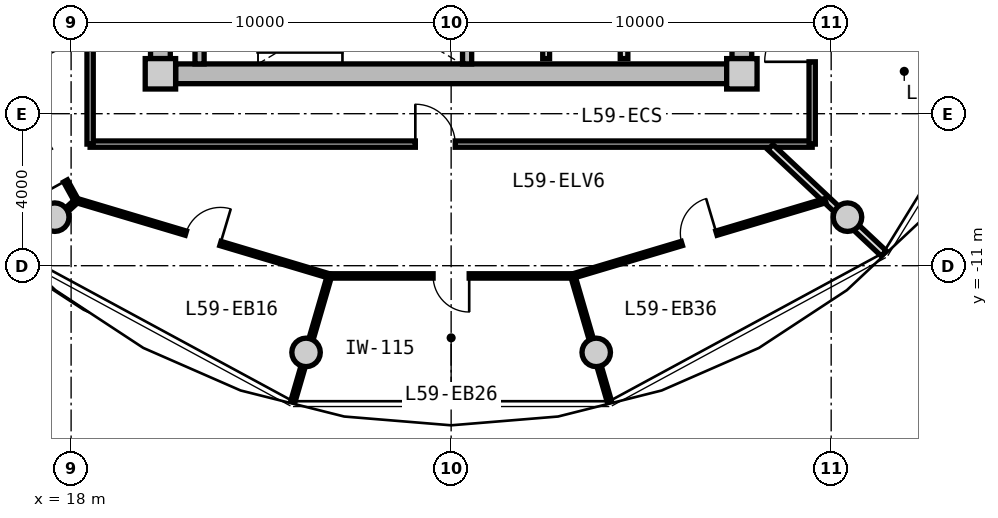
"""IFC4 building model, lengths in metres.
Left out: names, types, materials, properties, quantities, classifications, styles, units other than length and angle.
Written with IfcOpenShell. Run it as: python <this file> out.ifc"""

import sys

from ifc_helpers import new_model, si_unit, direction, frame, frame_2d, origin, origin_2d, place, context, subcontext, project, spatial, rectangle, circle, extrude, source, transform, mapped, element, fill, save


model = new_model("IFC4")
c1 = context("Model", 3, precision=1e-05, world=origin(), true_north=direction((0.0, 1.0)))
c2 = subcontext(c1, "Body", "Model", "MODEL_VIEW")
j1 = project(units=[si_unit("LENGTHUNIT", "METRE"), si_unit("PLANEANGLEUNIT", "RADIAN")], contexts=[c1])
p1 = place(None, origin())
s1 = spatial("IfcSite", under=j1, at=p1, CompositionType="ELEMENT")
p2 = place(p1, origin())
s2 = spatial("IfcBuilding", under=s1, at=p2, CompositionType="ELEMENT")
p3 = place(p2, frame((0.0, 0.0, 190.65)))
s3 = spatial("IfcBuildingStorey", under=s2, at=p3, CompositionType="ELEMENT", Elevation=190.65)
m1 = source(origin(), c2, "Body", "SweptSolid", [
    extrude(rectangle(XDim=0.8, YDim=0.8, at=origin_2d()), origin(), (0.0, 0.0, 1.0), 3.05),
])
for number, where, z_axis, x_axis in (
    (1, (20.35, -5.95, 0.0), (0.0, 0.0, 1.0), (1.0, 0.0, 0.0)),
    (2, (35.65, -5.95, 0.0), (0.0, 0.0, 1.0), (1.0, 0.0, 0.0)),
):
    element("IfcColumn", number, at=place(p3, frame(where, z_axis=z_axis, x_axis=x_axis)), inside=s3, PredefinedType="COLUMN", context=c2, shape_type="MappedRepresentation", body=[
        mapped(m1, transform((0.0, 0.0, 0.0), x_axis=(1.0, 0.0, 0.0), y_axis=(0.0, 1.0, 0.0), z_axis=(0.0, 0.0, 1.0), scale=1.0)),
    ])
m2 = source(origin(), c2, "Body", "SweptSolid", [
    extrude(rectangle(XDim=14.5, YDim=0.52, at=frame_2d((7.25, 0.0))), origin(), (0.0, 0.0, 1.0), 2.81),
])
p4 = place(p3, frame((35.25, -5.95, 0.0), z_axis=(0.0, 0.0, 1.0), x_axis=(-1.0, 0.0, 0.0)))
e3 = element("IfcWall", 3, at=p4, inside=s3, PredefinedType="SHEAR", context=c2, shape_type="MappedRepresentation", body=[
    mapped(m2, transform((0.0, 0.0, 0.0), x_axis=(1.0, 0.0, 0.0), y_axis=(0.0, 1.0, 0.0), z_axis=(0.0, 0.0, 1.0), scale=1.0)),
])
m3 = source(origin(), c2, "Body", "SweptSolid", [
    extrude(rectangle(XDim=11.1, YDim=0.52, at=frame_2d((5.55, 0.0))), origin(), (0.0, 0.0, 1.0), 2.81),
])
p5 = place(p3, frame((20.35, -5.55, 0.0), z_axis=(0.0, 0.0, 1.0), x_axis=(0.0, 1.0, 0.0)))
e4 = element("IfcWall", 4, at=p5, inside=s3, PredefinedType="SHEAR", context=c2, shape_type="MappedRepresentation", body=[
    mapped(m3, transform((0.0, 0.0, 0.0), x_axis=(1.0, 0.0, 0.0), y_axis=(0.0, 1.0, 0.0), z_axis=(0.0, 0.0, 1.0), scale=1.0)),
])
p6 = place(p5, frame((3.8, 0.0, 0.0)))
e5 = element("IfcOpeningElement", 5, at=p6, cuts=e4, PredefinedType="OPENING", context=c2, shape_type="SweptSolid", body=[
    extrude(rectangle(XDim=1.2, YDim=2.15, at=frame_2d((0.6, 1.075))), frame((0.0, 0.27, 0.0), z_axis=(0.0, -1.0, 0.0), x_axis=(1.0, 0.0, 0.0)), (0.0, 0.0, 1.0), 0.54),
])
p7 = place(p3, frame((35.65, 5.55, 0.0), z_axis=(0.0, 0.0, 1.0), x_axis=(0.0, -1.0, 0.0)))
e6 = element("IfcWall", 6, at=p7, inside=s3, PredefinedType="SHEAR", context=c2, shape_type="MappedRepresentation", body=[
    mapped(m3, transform((0.0, 0.0, 0.0), x_axis=(1.0, 0.0, 0.0), y_axis=(0.0, 1.0, 0.0), z_axis=(0.0, 0.0, 1.0), scale=1.0)),
])
p8 = place(p7, frame((5.65, 0.0, 0.0)))
e7 = element("IfcOpeningElement", 7, at=p8, cuts=e6, PredefinedType="OPENING", context=c2, shape_type="SweptSolid", body=[
    extrude(rectangle(XDim=1.2, YDim=2.15, at=frame_2d((0.6, 1.075))), frame((0.0, 0.27, 0.0), z_axis=(0.0, -1.0, 0.0), x_axis=(1.0, 0.0, 0.0)), (0.0, 0.0, 1.0), 0.54),
])
p9 = place(p7, frame((9.3, 0.0, 0.0)))
e8 = element("IfcOpeningElement", 8, at=p9, cuts=e6, PredefinedType="OPENING", context=c2, shape_type="SweptSolid", body=[
    extrude(rectangle(XDim=1.0, YDim=2.1, at=frame_2d((0.5, 1.05))), frame((0.0, 0.27, 0.0), z_axis=(0.0, -1.0, 0.0), x_axis=(1.0, 0.0, 0.0)), (0.0, 0.0, 1.0), 0.54),
])
m4 = source(origin(), c2, "Body", "SweptSolid", [
    extrude(circle(Radius=0.375, at=origin_2d()), origin(), (0.0, 0.0, 1.0), 3.47),
])
for number, where, z_axis, x_axis in (
    (9, (17.57, -9.723, -0.42), (0.0, 0.0, 1.0), (1.0, 0.0, 0.0)),
    (10, (24.182, -13.281, -0.42), (0.0, 0.0, 1.0), (1.0, 0.0, 0.0)),
    (11, (31.818, -13.281, -0.42), (0.0, 0.0, 1.0), (1.0, 0.0, 0.0)),
    (12, (38.43, -9.723, -0.42), (0.0, 0.0, 1.0), (1.0, 0.0, 0.0)),
):
    element("IfcColumn", number, at=place(p3, frame(where, z_axis=z_axis, x_axis=x_axis)), inside=s3, PredefinedType="COLUMN", context=c2, shape_type="MappedRepresentation", body=[
        mapped(m4, transform((0.0, 0.0, 0.0), x_axis=(1.0, 0.0, 0.0), y_axis=(0.0, 1.0, 0.0), z_axis=(0.0, 0.0, 1.0), scale=1.0)),
    ])
m5 = source(origin(), c2, "Body", "SweptSolid", [
    extrude(rectangle(XDim=3.24, YDim=0.24, at=frame_2d((1.62, 0.0))), origin(), (0.0, 0.0, 1.0), 2.81),
])
for number, where, z_axis, x_axis in (
    (13, (21.38, -5.69, 0.0), (0.0, 0.0, 1.0), (0.0, 1.0, 0.0)),
    (14, (28.42, -5.69, 0.0), (0.0, 0.0, 1.0), (0.0, 1.0, 0.0)),
):
    element("IfcWall", number, at=place(p3, frame(where, z_axis=z_axis, x_axis=x_axis)), inside=s3, PredefinedType="PARTITIONING", context=c2, shape_type="MappedRepresentation", body=[
        mapped(m5, transform((0.0, 0.0, 0.0), x_axis=(1.0, 0.0, 0.0), y_axis=(0.0, 1.0, 0.0), z_axis=(0.0, 0.0, 1.0), scale=1.0)),
    ])
m6 = source(origin(), c2, "Body", "SweptSolid", [
    extrude(rectangle(XDim=3.8, YDim=0.2, at=frame_2d((1.9, 0.0))), origin(), (0.0, 0.0, 1.0), 2.795),
])
p10 = place(p3, frame((32.55, -5.55, 0.0), z_axis=(0.0, 0.0, 1.0), x_axis=(0.0, 1.0, 0.0)))
e15 = element("IfcWall", 15, at=p10, inside=s3, PredefinedType="PARTITIONING", context=c2, shape_type="MappedRepresentation", body=[
    mapped(m6, transform((0.0, 0.0, 0.0), x_axis=(1.0, 0.0, 0.0), y_axis=(0.0, 1.0, 0.0), z_axis=(0.0, 0.0, 1.0), scale=1.0)),
])
m7 = source(origin(), c2, "Body", "SweptSolid", [
    extrude(rectangle(XDim=4.2, YDim=0.18, at=frame_2d((2.1, 0.0))), origin(), (0.0, 0.0, 1.0), 2.795),
])
p11 = place(p3, frame((30.5, -5.55, 0.0), z_axis=(0.0, 0.0, 1.0), x_axis=(0.0, 1.0, 0.0)))
e16 = element("IfcWall", 16, at=p11, inside=s3, PredefinedType="PARTITIONING", context=c2, shape_type="MappedRepresentation", body=[
    mapped(m7, transform((0.0, 0.0, 0.0), x_axis=(1.0, 0.0, 0.0), y_axis=(0.0, 1.0, 0.0), z_axis=(0.0, 0.0, 1.0), scale=1.0)),
])
m8 = source(origin(), c2, "Body", "SweptSolid", [
    extrude(rectangle(XDim=19.0, YDim=0.165, at=frame_2d((9.5, 0.0))), origin(), (0.0, 0.0, 1.0), 2.795),
])
p12 = place(p3, frame((37.5, -7.8, 0.0), z_axis=(0.0, 0.0, 1.0), x_axis=(-1.0, 0.0, 0.0)))
e17 = element("IfcWall", 17, at=p12, inside=s3, PredefinedType="PARTITIONING", context=c2, shape_type="MappedRepresentation", body=[
    mapped(m8, transform((0.0, 0.0, 0.0), x_axis=(1.0, 0.0, 0.0), y_axis=(0.0, 1.0, 0.0), z_axis=(0.0, 0.0, 1.0), scale=1.0)),
])
p13 = place(p12, frame((9.392, 0.0, 0.0)))
e18 = element("IfcOpeningElement", 18, at=p13, cuts=e17, PredefinedType="OPENING", context=c2, shape_type="SweptSolid", body=[
    extrude(rectangle(XDim=1.05, YDim=2.15, at=frame_2d((0.525, 1.075))), frame((0.0, 0.093, 0.0), z_axis=(0.0, -1.0, 0.0), x_axis=(1.0, 0.0, 0.0)), (0.0, 0.0, 1.0), 0.185),
])
m9 = source(origin(), c2, "Body", "SweptSolid", [
    extrude(rectangle(XDim=6.88, YDim=0.165, at=frame_2d((3.44, 0.0))), origin(), (0.0, 0.0, 1.0), 2.795),
])
p14 = place(p3, frame((18.5, -7.8, 0.0), z_axis=(0.0, 0.0, 1.0), x_axis=(0.0, 1.0, 0.0)))
e19 = element("IfcWall", 19, at=p14, inside=s3, PredefinedType="PARTITIONING", context=c2, shape_type="MappedRepresentation", body=[
    mapped(m9, transform((0.0, 0.0, 0.0), x_axis=(1.0, 0.0, 0.0), y_axis=(0.0, 1.0, 0.0), z_axis=(0.0, 0.0, 1.0), scale=1.0)),
])
p15 = place(p3, frame((37.5, -0.92, 0.0), z_axis=(0.0, 0.0, 1.0), x_axis=(0.0, -1.0, 0.0)))
e20 = element("IfcWall", 20, at=p15, inside=s3, PredefinedType="PARTITIONING", context=c2, shape_type="MappedRepresentation", body=[
    mapped(m9, transform((0.0, 0.0, 0.0), x_axis=(1.0, 0.0, 0.0), y_axis=(0.0, 1.0, 0.0), z_axis=(0.0, 0.0, 1.0), scale=1.0)),
])
p16 = place(p15, frame((3.464, 0.0, 0.0)))
e21 = element("IfcOpeningElement", 21, at=p16, cuts=e20, PredefinedType="OPENING", context=c2, shape_type="SweptSolid", body=[
    extrude(rectangle(XDim=1.25, YDim=2.2, at=frame_2d((0.625, 1.1))), frame((0.0, 0.093, 0.0), z_axis=(0.0, -1.0, 0.0), x_axis=(1.0, 0.0, 0.0)), (0.0, 0.0, 1.0), 0.185),
])
m10 = source(origin(), c2, "Body", "SweptSolid", [
    extrude(rectangle(XDim=4.089, YDim=0.19, at=frame_2d((2.044, 0.0))), origin(), (0.0, 0.0, 1.0), 2.395),
])
p17 = place(p3, frame((36.402, -7.88, 0.0), z_axis=(0.0, 0.0, 1.0), x_axis=(0.729401273609, -0.684086092577, 0.0)))
e22 = element("IfcWall", 22, at=p17, inside=s3, PredefinedType="PARTITIONING", context=c2, shape_type="MappedRepresentation", body=[
    mapped(m10, transform((0.0, 0.0, 0.0), x_axis=(1.0, 0.0, 0.0), y_axis=(0.0, 1.0, 0.0), z_axis=(0.0, 0.0, 1.0), scale=1.0)),
])
m11 = source(origin(), c2, "Body", "SweptSolid", [
    extrude(rectangle(XDim=6.936, YDim=0.115, at=frame_2d((3.468, 0.0))), origin(), (0.0, 0.0, 1.0), 2.795),
])
p18 = place(p3, frame((18.151, -9.287, 0.0), z_axis=(0.0, 0.0, 1.0), x_axis=(0.958186895835, -0.286143098205, 0.0)))
e23 = element("IfcWall", 23, at=p18, inside=s3, PredefinedType="PARTITIONING", context=c2, shape_type="MappedRepresentation", body=[
    mapped(m11, transform((0.0, 0.0, 0.0), x_axis=(1.0, 0.0, 0.0), y_axis=(0.0, 1.0, 0.0), z_axis=(0.0, 0.0, 1.0), scale=1.0)),
])
p19 = place(p18, frame((2.993, 0.0, 0.0)))
e24 = element("IfcOpeningElement", 24, at=p19, cuts=e23, PredefinedType="OPENING", context=c2, shape_type="SweptSolid", body=[
    extrude(rectangle(XDim=0.95, YDim=2.1, at=frame_2d((0.475, 1.05))), frame((0.0, 0.067, 0.0), z_axis=(0.0, -1.0, 0.0), x_axis=(1.0, 0.0, 0.0)), (0.0, 0.0, 1.0), 0.135),
])
m12 = source(origin(), c2, "Body", "SweptSolid", [
    extrude(rectangle(XDim=2.072, YDim=0.115, at=frame_2d((1.036, 0.0))), origin(), (0.0, 0.0, 1.0), 2.395),
])
p20 = place(p3, frame((18.151, -9.287, 0.0), z_axis=(0.0, 0.0, 1.0), x_axis=(-0.741410125356, -0.671052178314, 0.0)))
e25 = element("IfcWall", 25, at=p20, inside=s3, PredefinedType="PARTITIONING", context=c2, shape_type="MappedRepresentation", body=[
    mapped(m12, transform((0.0, 0.0, 0.0), x_axis=(1.0, 0.0, 0.0), y_axis=(0.0, 1.0, 0.0), z_axis=(0.0, 0.0, 1.0), scale=1.0)),
])
m13 = source(origin(), c2, "Body", "SweptSolid", [
    extrude(rectangle(XDim=6.404, YDim=0.115, at=frame_2d((3.202, 0.0))), origin(), (0.0, 0.0, 1.0), 2.795),
])
p21 = place(p3, frame((24.798, -11.269, 0.0), z_axis=(0.0, 0.0, 1.0), x_axis=(1.0, 0.0, 0.0)))
e26 = element("IfcWall", 26, at=p21, inside=s3, PredefinedType="PARTITIONING", context=c2, shape_type="MappedRepresentation", body=[
    mapped(m13, transform((0.0, 0.0, 0.0), x_axis=(1.0, 0.0, 0.0), y_axis=(0.0, 1.0, 0.0), z_axis=(0.0, 0.0, 1.0), scale=1.0)),
])
p22 = place(p21, frame((2.727, 0.0, 0.0)))
e27 = element("IfcOpeningElement", 27, at=p22, cuts=e26, PredefinedType="OPENING", context=c2, shape_type="SweptSolid", body=[
    extrude(rectangle(XDim=0.95, YDim=2.1, at=frame_2d((0.475, 1.05))), frame((0.0, 0.067, 0.0), z_axis=(0.0, -1.0, 0.0), x_axis=(1.0, 0.0, 0.0)), (0.0, 0.0, 1.0), 0.135),
])
m14 = source(origin(), c2, "Body", "SweptSolid", [
    extrude(rectangle(XDim=3.454, YDim=0.115, at=frame_2d((1.727, 0.0))), origin(), (0.0, 0.0, 1.0), 2.395),
])
p23 = place(p3, frame((24.798, -11.269, 0.0), z_axis=(0.0, 0.0, 1.0), x_axis=(-0.279348499358, -0.960189781193, 0.0)))
e28 = element("IfcWall", 28, at=p23, inside=s3, PredefinedType="PARTITIONING", context=c2, shape_type="MappedRepresentation", body=[
    mapped(m14, transform((0.0, 0.0, 0.0), x_axis=(1.0, 0.0, 0.0), y_axis=(0.0, 1.0, 0.0), z_axis=(0.0, 0.0, 1.0), scale=1.0)),
])
p24 = place(p3, frame((31.203, -11.272, 0.0), z_axis=(0.0, 0.0, 1.0), x_axis=(0.958186895835, 0.286143098205, 0.0)))
e29 = element("IfcWall", 29, at=p24, inside=s3, PredefinedType="PARTITIONING", context=c2, shape_type="MappedRepresentation", body=[
    mapped(m11, transform((0.0, 0.0, 0.0), x_axis=(1.0, 0.0, 0.0), y_axis=(0.0, 1.0, 0.0), z_axis=(0.0, 0.0, 1.0), scale=1.0)),
])
p25 = place(p24, frame((2.993, 0.0, 0.0)))
e30 = element("IfcOpeningElement", 30, at=p25, cuts=e29, PredefinedType="OPENING", context=c2, shape_type="SweptSolid", body=[
    extrude(rectangle(XDim=0.95, YDim=2.1, at=frame_2d((0.475, 1.05))), frame((0.0, 0.067, 0.0), z_axis=(0.0, -1.0, 0.0), x_axis=(1.0, 0.0, 0.0)), (0.0, 0.0, 1.0), 0.135),
])
m15 = source(origin(), c2, "Body", "SweptSolid", [
    extrude(rectangle(XDim=3.451, YDim=0.115, at=frame_2d((1.726, 0.0))), origin(), (0.0, 0.0, 1.0), 2.395),
])
p26 = place(p3, frame((31.203, -11.272, 0.0), z_axis=(0.0, 0.0, 1.0), x_axis=(0.279361559083, -0.960185981624, 0.0)))
e31 = element("IfcWall", 31, at=p26, inside=s3, PredefinedType="PARTITIONING", context=c2, shape_type="MappedRepresentation", body=[
    mapped(m15, transform((0.0, 0.0, 0.0), x_axis=(1.0, 0.0, 0.0), y_axis=(0.0, 1.0, 0.0), z_axis=(0.0, 0.0, 1.0), scale=1.0)),
])
m16 = source(origin(), c2, "Body", "SweptSolid", [
    extrude(rectangle(XDim=1.638, YDim=0.14, at=frame_2d((0.819, 0.0))), origin(), (0.0, 0.0, 1.0), 2.795),
])
p27 = place(p3, frame((18.47, -4.778, 0.0), z_axis=(0.0, 0.0, 1.0), x_axis=(-0.893919977945, -0.448226586707, 0.0)))
e32 = element("IfcWall", 32, at=p27, inside=s3, PredefinedType="PARTITIONING", context=c2, shape_type="MappedRepresentation", body=[
    mapped(m16, transform((0.0, 0.0, 0.0), x_axis=(1.0, 0.0, 0.0), y_axis=(0.0, 1.0, 0.0), z_axis=(0.0, 0.0, 1.0), scale=1.0)),
])
m17 = source(origin(), c2, "Body", "SweptSolid", [
    extrude(rectangle(XDim=3.45, YDim=0.115, at=frame_2d((1.725, 0.0))), origin(), (0.0, 0.0, 1.0), 2.795),
])
p28 = place(p3, frame((16.475, -6.275, 0.0), z_axis=(0.0, 0.0, 1.0), x_axis=(0.483659007882, -0.875256513312, 0.0)))
e33 = element("IfcWall", 33, at=p28, inside=s3, PredefinedType="PARTITIONING", context=c2, shape_type="MappedRepresentation", body=[
    mapped(m17, transform((0.0, 0.0, 0.0), x_axis=(1.0, 0.0, 0.0), y_axis=(0.0, 1.0, 0.0), z_axis=(0.0, 0.0, 1.0), scale=1.0)),
])
p29 = place(p28, frame((1.9, 0.0, 0.0)))
e34 = element("IfcOpeningElement", 34, at=p29, cuts=e33, PredefinedType="OPENING", context=c2, shape_type="SweptSolid", body=[
    extrude(rectangle(XDim=0.95, YDim=2.1, at=frame_2d((0.475, 1.05))), frame((0.0, 0.067, 0.0), z_axis=(0.0, -1.0, 0.0), x_axis=(1.0, 0.0, 0.0)), (0.0, 0.0, 1.0), 0.135),
])
m18 = source(origin(), c2, "Body", "SweptSolid", [
    extrude(rectangle(XDim=1.05, YDim=2.15, at=frame_2d((0.525, 1.075))), frame((0.0, 0.025, 0.0), z_axis=(0.0, -1.0, 0.0), x_axis=(1.0, 0.0, 0.0)), (0.0, 0.0, 1.0), 0.05),
])
p30 = place(p13, frame((1.05, 0.0, 0.0), z_axis=(0.0, 0.0, 1.0), x_axis=(-1.0, 0.0, 0.0)))
e35 = element("IfcDoor", 35, at=p30, inside=s3, OperationType="SINGLE_SWING_LEFT", PredefinedType="DOOR", context=c2, shape_type="MappedRepresentation", body=[
    mapped(m18, transform((0.0, 0.0, 0.0), x_axis=(1.0, 0.0, 0.0), y_axis=(0.0, 1.0, 0.0), z_axis=(0.0, 0.0, 1.0), scale=1.0)),
])
fill(e18, e35)
m19 = source(origin(), c2, "Body", "SweptSolid", [
    extrude(rectangle(XDim=0.95, YDim=2.1, at=frame_2d((0.475, 1.05))), frame((0.0, 0.025, 0.0), z_axis=(0.0, -1.0, 0.0), x_axis=(1.0, 0.0, 0.0)), (0.0, 0.0, 1.0), 0.05),
])
p31 = place(p29, frame((0.95, 0.0, 0.0), z_axis=(0.0, 0.0, 1.0), x_axis=(-1.0, 0.0, 0.0)))
e36 = element("IfcDoor", 36, at=p31, inside=s3, OperationType="SINGLE_SWING_LEFT", PredefinedType="DOOR", context=c2, shape_type="MappedRepresentation", body=[
    mapped(m19, transform((0.0, 0.0, 0.0), x_axis=(1.0, 0.0, 0.0), y_axis=(0.0, 1.0, 0.0), z_axis=(0.0, 0.0, 1.0), scale=1.0)),
])
fill(e34, e36)
p32 = place(p19, origin())
e37 = element("IfcDoor", 37, at=p32, inside=s3, OperationType="SINGLE_SWING_RIGHT", PredefinedType="DOOR", context=c2, shape_type="MappedRepresentation", body=[
    mapped(m19, transform((0.0, 0.0, 0.0), x_axis=(1.0, 0.0, 0.0), y_axis=(0.0, 1.0, 0.0), z_axis=(0.0, 0.0, 1.0), scale=1.0)),
])
fill(e24, e37)
p33 = place(p22, frame((0.95, 0.0, 0.0), z_axis=(0.0, 0.0, 1.0), x_axis=(-1.0, 0.0, 0.0)))
e38 = element("IfcDoor", 38, at=p33, inside=s3, OperationType="SINGLE_SWING_LEFT", PredefinedType="DOOR", context=c2, shape_type="MappedRepresentation", body=[
    mapped(m19, transform((0.0, 0.0, 0.0), x_axis=(1.0, 0.0, 0.0), y_axis=(0.0, 1.0, 0.0), z_axis=(0.0, 0.0, 1.0), scale=1.0)),
])
fill(e27, e38)
p34 = place(p25, origin())
e39 = element("IfcDoor", 39, at=p34, inside=s3, OperationType="SINGLE_SWING_RIGHT", PredefinedType="DOOR", context=c2, shape_type="MappedRepresentation", body=[
    mapped(m19, transform((0.0, 0.0, 0.0), x_axis=(1.0, 0.0, 0.0), y_axis=(0.0, 1.0, 0.0), z_axis=(0.0, 0.0, 1.0), scale=1.0)),
])
fill(e30, e39)
m20 = source(origin(), c2, "Body", "SweptSolid", [
    extrude(rectangle(XDim=1.25, YDim=2.2, at=frame_2d((0.625, 1.1))), frame((0.0, 0.025, 0.0), z_axis=(0.0, -1.0, 0.0), x_axis=(1.0, 0.0, 0.0)), (0.0, 0.0, 1.0), 0.05),
])
p35 = place(p16, frame((1.25, 0.0, 0.0), z_axis=(0.0, 0.0, 1.0), x_axis=(-1.0, 0.0, 0.0)))
e40 = element("IfcDoor", 40, at=p35, inside=s3, OperationType="SINGLE_SWING_LEFT", PredefinedType="DOOR", context=c2, shape_type="MappedRepresentation", body=[
    mapped(m20, transform((0.0, 0.0, 0.0), x_axis=(1.0, 0.0, 0.0), y_axis=(0.0, 1.0, 0.0), z_axis=(0.0, 0.0, 1.0), scale=1.0)),
])
fill(e21, e40)
save(model, sys.argv[1])
